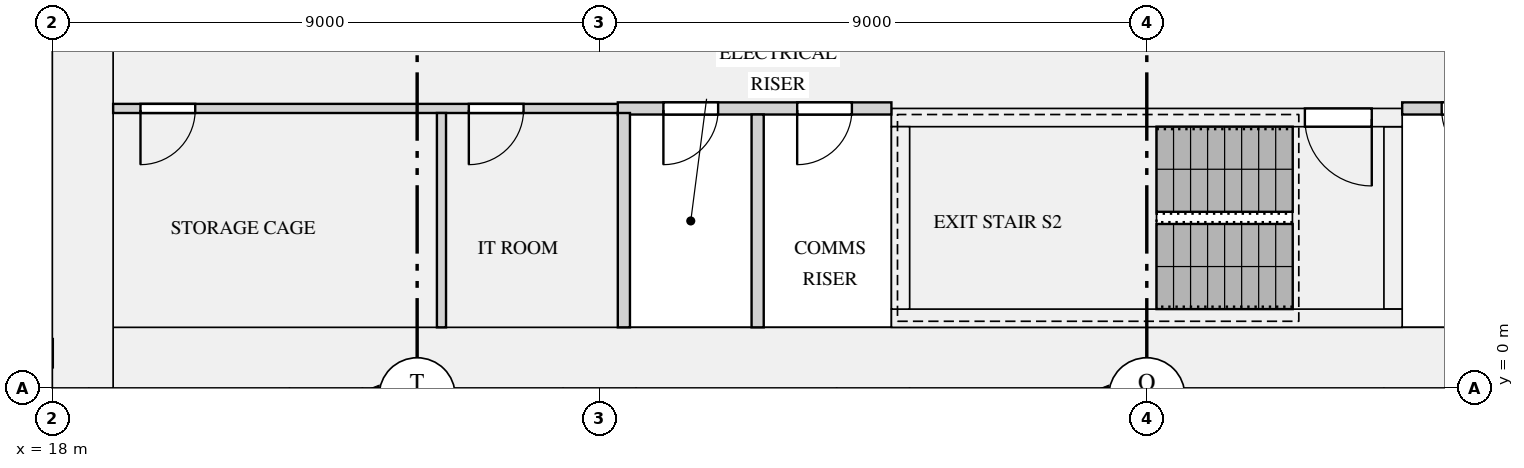
"""IFC4 building model, lengths in metres.
Left out: names, types, materials, properties, quantities, classifications, styles, units other than length and angle.
Written with IfcOpenShell. Run it as: python <this file> out.ifc"""

import sys

from ifc_helpers import new_model, si_unit, direction, frame, frame_2d, origin, place, context, subcontext, project, spatial, rectangle, extrude, element, fill, save


model = new_model("IFC4")
c1 = context("Model", 3, precision=1e-05, world=origin(), true_north=direction((0.0, 1.0)))
c2 = subcontext(c1, "Body", "Model", "MODEL_VIEW")
j1 = project(units=[si_unit("LENGTHUNIT", "METRE"), si_unit("PLANEANGLEUNIT", "RADIAN")], contexts=[c1])
p1 = place(None, origin())
s1 = spatial("IfcSite", under=j1, at=p1, CompositionType="ELEMENT")
p2 = place(p1, origin())
s2 = spatial("IfcBuilding", under=s1, at=p2, CompositionType="ELEMENT")
p3 = place(p2, frame((0.0, 0.0, 47.85)))
s3 = spatial("IfcBuildingStorey", under=s2, at=p3, CompositionType="ELEMENT", Elevation=47.85)
p4 = place(p3, frame((18.5, 0.0, 0.0), z_axis=(0.0, 0.0, 1.0), x_axis=(0.0, 1.0, 0.0)))
e1 = element("IfcWall", 1, at=p4, inside=s3, PredefinedType="SHEAR", context=c2, shape_type="SweptSolid", body=[
    extrude(rectangle(XDim=12.5, YDim=1.0, at=frame_2d((6.25, 0.0))), origin(), (0.0, 0.0, 1.0), 3.15),
])
p5 = place(p3, frame((19.0, 0.5, 0.0), z_axis=(0.0, 0.0, 1.0), x_axis=(1.0, 0.0, 0.0)))
e2 = element("IfcWall", 2, at=p5, inside=s3, PredefinedType="SHEAR", context=c2, shape_type="SweptSolid", body=[
    extrude(rectangle(XDim=34.0, YDim=1.0, at=frame_2d((17.0, 0.0))), origin(), (0.0, 0.0, 1.0), 3.15),
])
p6 = place(p3, frame((31.8, 1.15, 0.0), z_axis=(0.0, 0.0, 1.0), x_axis=(1.0, 0.0, 0.0)))
e3 = element("IfcWall", 3, at=p6, inside=s3, PredefinedType="SHEAR", context=c2, shape_type="SweptSolid", body=[
    extrude(rectangle(XDim=8.4, YDim=0.3, at=frame_2d((4.2, 0.0))), origin(), (0.0, 0.0, 1.0), 3.15),
])
p7 = place(p3, frame((31.8, 4.45, 0.0), z_axis=(0.0, 0.0, 1.0), x_axis=(1.0, 0.0, 0.0)))
e4 = element("IfcWall", 4, at=p7, inside=s3, PredefinedType="SHEAR", context=c2, shape_type="SweptSolid", body=[
    extrude(rectangle(XDim=8.4, YDim=0.3, at=frame_2d((4.2, 0.0))), origin(), (0.0, 0.0, 1.0), 3.15),
])
p8 = place(p7, frame((6.8, 0.0, 0.0)))
e5 = element("IfcOpeningElement", 5, at=p8, cuts=e4, PredefinedType="OPENING", context=c2, shape_type="SweptSolid", body=[
    extrude(rectangle(XDim=1.1, YDim=2.1, at=frame_2d((0.55, 1.05))), frame((0.0, 0.16, 0.0), z_axis=(0.0, -1.0, 0.0), x_axis=(1.0, 0.0, 0.0)), (0.0, 0.0, 1.0), 0.32),
])
for number, where, z_axis, x_axis in (
    (6, (31.95, 1.3, 0.0), (0.0, 0.0, 1.0), (0.0, 1.0, 0.0)),
    (7, (40.05, 1.3, 0.0), (0.0, 0.0, 1.0), (0.0, 1.0, 0.0)),
):
    element("IfcWall", number, at=place(p3, frame(where, z_axis=z_axis, x_axis=x_axis)), inside=s3, PredefinedType="SHEAR", context=c2, shape_type="SweptSolid", body=[
        extrude(rectangle(XDim=3.0, YDim=0.3, at=frame_2d((1.5, 0.0))), origin(), (0.0, 0.0, 1.0), 3.15),
    ])
p9 = place(p3, frame((27.3, 4.6, 0.0), z_axis=(0.0, 0.0, 1.0), x_axis=(1.0, 0.0, 0.0)))
e8 = element("IfcWall", 8, at=p9, inside=s3, PredefinedType="PARTITIONING", context=c2, shape_type="SweptSolid", body=[
    extrude(rectangle(XDim=4.5, YDim=0.2, at=frame_2d((2.25, 0.0))), origin(), (0.0, 0.0, 1.0), 2.83),
])
p10 = place(p9, frame((0.75, 0.0, 0.0)))
e9 = element("IfcOpeningElement", 9, at=p10, cuts=e8, PredefinedType="OPENING", context=c2, shape_type="SweptSolid", body=[
    extrude(rectangle(XDim=0.9, YDim=2.1, at=frame_2d((0.45, 1.05))), frame((0.0, 0.11, 0.0), z_axis=(0.0, -1.0, 0.0), x_axis=(1.0, 0.0, 0.0)), (0.0, 0.0, 1.0), 0.22),
])
p11 = place(p9, frame((2.95, 0.0, 0.0)))
e10 = element("IfcOpeningElement", 10, at=p11, cuts=e8, PredefinedType="OPENING", context=c2, shape_type="SweptSolid", body=[
    extrude(rectangle(XDim=0.9, YDim=2.1, at=frame_2d((0.45, 1.05))), frame((0.0, 0.11, 0.0), z_axis=(0.0, -1.0, 0.0), x_axis=(1.0, 0.0, 0.0)), (0.0, 0.0, 1.0), 0.22),
])
p12 = place(p3, frame((40.2, 4.6, 0.0), z_axis=(0.0, 0.0, 1.0), x_axis=(1.0, 0.0, 0.0)))
e11 = element("IfcWall", 11, at=p12, inside=s3, PredefinedType="PARTITIONING", context=c2, shape_type="SweptSolid", body=[
    extrude(rectangle(XDim=4.5, YDim=0.2, at=frame_2d((2.25, 0.0))), origin(), (0.0, 0.0, 1.0), 2.83),
])
p13 = place(p12, frame((0.65, 0.0, 0.0)))
e12 = element("IfcOpeningElement", 12, at=p13, cuts=e11, PredefinedType="OPENING", context=c2, shape_type="SweptSolid", body=[
    extrude(rectangle(XDim=0.9, YDim=2.1, at=frame_2d((0.45, 1.05))), frame((0.0, 0.11, 0.0), z_axis=(0.0, -1.0, 0.0), x_axis=(1.0, 0.0, 0.0)), (0.0, 0.0, 1.0), 0.22),
])
p14 = place(p12, frame((2.85, 0.0, 0.0)))
e13 = element("IfcOpeningElement", 13, at=p14, cuts=e11, PredefinedType="OPENING", context=c2, shape_type="SweptSolid", body=[
    extrude(rectangle(XDim=0.9, YDim=2.1, at=frame_2d((0.45, 1.05))), frame((0.0, 0.11, 0.0), z_axis=(0.0, -1.0, 0.0), x_axis=(1.0, 0.0, 0.0)), (0.0, 0.0, 1.0), 0.22),
])
p15 = place(p3, frame((19.0, 4.6, 0.0), z_axis=(0.0, 0.0, 1.0), x_axis=(1.0, 0.0, 0.0)))
e14 = element("IfcWall", 14, at=p15, inside=s3, PredefinedType="PARTITIONING", context=c2, shape_type="SweptSolid", body=[
    extrude(rectangle(XDim=8.3, YDim=0.15, at=frame_2d((4.15, 0.0))), origin(), (0.0, 0.0, 1.0), 2.83),
])
p16 = place(p15, frame((0.45, 0.0, 0.0)))
e15 = element("IfcOpeningElement", 15, at=p16, cuts=e14, PredefinedType="OPENING", context=c2, shape_type="SweptSolid", body=[
    extrude(rectangle(XDim=0.9, YDim=2.1, at=frame_2d((0.45, 1.05))), frame((0.0, 0.085, 0.0), z_axis=(0.0, -1.0, 0.0), x_axis=(1.0, 0.0, 0.0)), (0.0, 0.0, 1.0), 0.17),
])
p17 = place(p15, frame((5.85, 0.0, 0.0)))
e16 = element("IfcOpeningElement", 16, at=p17, cuts=e14, PredefinedType="OPENING", context=c2, shape_type="SweptSolid", body=[
    extrude(rectangle(XDim=0.9, YDim=2.1, at=frame_2d((0.45, 1.05))), frame((0.0, 0.085, 0.0), z_axis=(0.0, -1.0, 0.0), x_axis=(1.0, 0.0, 0.0)), (0.0, 0.0, 1.0), 0.17),
])
p18 = place(p3, frame((24.4, 1.0, 0.0), z_axis=(0.0, 0.0, 1.0), x_axis=(0.0, 1.0, 0.0)))
e17 = element("IfcWall", 17, at=p18, inside=s3, PredefinedType="PARTITIONING", context=c2, shape_type="SweptSolid", body=[
    extrude(rectangle(XDim=3.525, YDim=0.15, at=frame_2d((1.762, 0.0))), origin(), (0.0, 0.0, 1.0), 2.83),
])
p19 = place(p3, frame((27.4, 1.0, 0.0), z_axis=(0.0, 0.0, 1.0), x_axis=(0.0, 1.0, 0.0)))
e18 = element("IfcWall", 18, at=p19, inside=s3, PredefinedType="PARTITIONING", context=c2, shape_type="SweptSolid", body=[
    extrude(rectangle(XDim=3.525, YDim=0.2, at=frame_2d((1.762, 0.0))), origin(), (0.0, 0.0, 1.0), 2.83),
])
p20 = place(p3, frame((29.6, 1.0, 0.0), z_axis=(0.0, 0.0, 1.0), x_axis=(0.0, 1.0, 0.0)))
e19 = element("IfcWall", 19, at=p20, inside=s3, PredefinedType="PARTITIONING", context=c2, shape_type="SweptSolid", body=[
    extrude(rectangle(XDim=3.5, YDim=0.2, at=frame_2d((1.75, 0.0))), origin(), (0.0, 0.0, 1.0), 2.83),
])
p21 = place(p8, frame((1.1, 0.0, 0.0), z_axis=(0.0, 0.0, 1.0), x_axis=(-1.0, 0.0, 0.0)))
e20 = element("IfcDoor", 20, at=p21, inside=s3, OperationType="SINGLE_SWING_LEFT", PredefinedType="DOOR", context=c2, shape_type="SweptSolid", body=[
    extrude(rectangle(XDim=1.1, YDim=2.1, at=frame_2d((0.55, 1.05))), frame((0.0, 0.025, 0.0), z_axis=(0.0, -1.0, 0.0), x_axis=(1.0, 0.0, 0.0)), (0.0, 0.0, 1.0), 0.05),
])
fill(e5, e20)
p22 = place(p16, frame((0.9, 0.0, 0.0), z_axis=(0.0, 0.0, 1.0), x_axis=(-1.0, 0.0, 0.0)))
e21 = element("IfcDoor", 21, at=p22, inside=s3, OperationType="SINGLE_SWING_RIGHT", PredefinedType="DOOR", context=c2, shape_type="SweptSolid", body=[
    extrude(rectangle(XDim=0.9, YDim=2.1, at=frame_2d((0.45, 1.05))), frame((0.0, 0.025, 0.0), z_axis=(0.0, -1.0, 0.0), x_axis=(1.0, 0.0, 0.0)), (0.0, 0.0, 1.0), 0.05),
])
fill(e15, e21)
p23 = place(p17, frame((0.9, 0.0, 0.0), z_axis=(0.0, 0.0, 1.0), x_axis=(-1.0, 0.0, 0.0)))
e22 = element("IfcDoor", 22, at=p23, inside=s3, OperationType="SINGLE_SWING_RIGHT", PredefinedType="DOOR", context=c2, shape_type="SweptSolid", body=[
    extrude(rectangle(XDim=0.9, YDim=2.1, at=frame_2d((0.45, 1.05))), frame((0.0, 0.025, 0.0), z_axis=(0.0, -1.0, 0.0), x_axis=(1.0, 0.0, 0.0)), (0.0, 0.0, 1.0), 0.05),
])
fill(e16, e22)
p24 = place(p10, frame((0.9, 0.0, 0.0), z_axis=(0.0, 0.0, 1.0), x_axis=(-1.0, 0.0, 0.0)))
e23 = element("IfcDoor", 23, at=p24, inside=s3, OperationType="SINGLE_SWING_RIGHT", PredefinedType="DOOR", context=c2, shape_type="SweptSolid", body=[
    extrude(rectangle(XDim=0.9, YDim=2.1, at=frame_2d((0.45, 1.05))), frame((0.0, 0.025, 0.0), z_axis=(0.0, -1.0, 0.0), x_axis=(1.0, 0.0, 0.0)), (0.0, 0.0, 1.0), 0.05),
])
fill(e9, e23)
p25 = place(p11, frame((0.9, 0.0, 0.0), z_axis=(0.0, 0.0, 1.0), x_axis=(-1.0, 0.0, 0.0)))
e24 = element("IfcDoor", 24, at=p25, inside=s3, OperationType="SINGLE_SWING_RIGHT", PredefinedType="DOOR", context=c2, shape_type="SweptSolid", body=[
    extrude(rectangle(XDim=0.9, YDim=2.1, at=frame_2d((0.45, 1.05))), frame((0.0, 0.025, 0.0), z_axis=(0.0, -1.0, 0.0), x_axis=(1.0, 0.0, 0.0)), (0.0, 0.0, 1.0), 0.05),
])
fill(e10, e24)
p26 = place(p13, frame((0.9, 0.0, 0.0), z_axis=(0.0, 0.0, 1.0), x_axis=(-1.0, 0.0, 0.0)))
e25 = element("IfcDoor", 25, at=p26, inside=s3, OperationType="SINGLE_SWING_LEFT", PredefinedType="DOOR", context=c2, shape_type="SweptSolid", body=[
    extrude(rectangle(XDim=0.9, YDim=2.1, at=frame_2d((0.45, 1.05))), frame((0.0, 0.025, 0.0), z_axis=(0.0, -1.0, 0.0), x_axis=(1.0, 0.0, 0.0)), (0.0, 0.0, 1.0), 0.05),
])
fill(e12, e25)
save(model, sys.argv[1])
